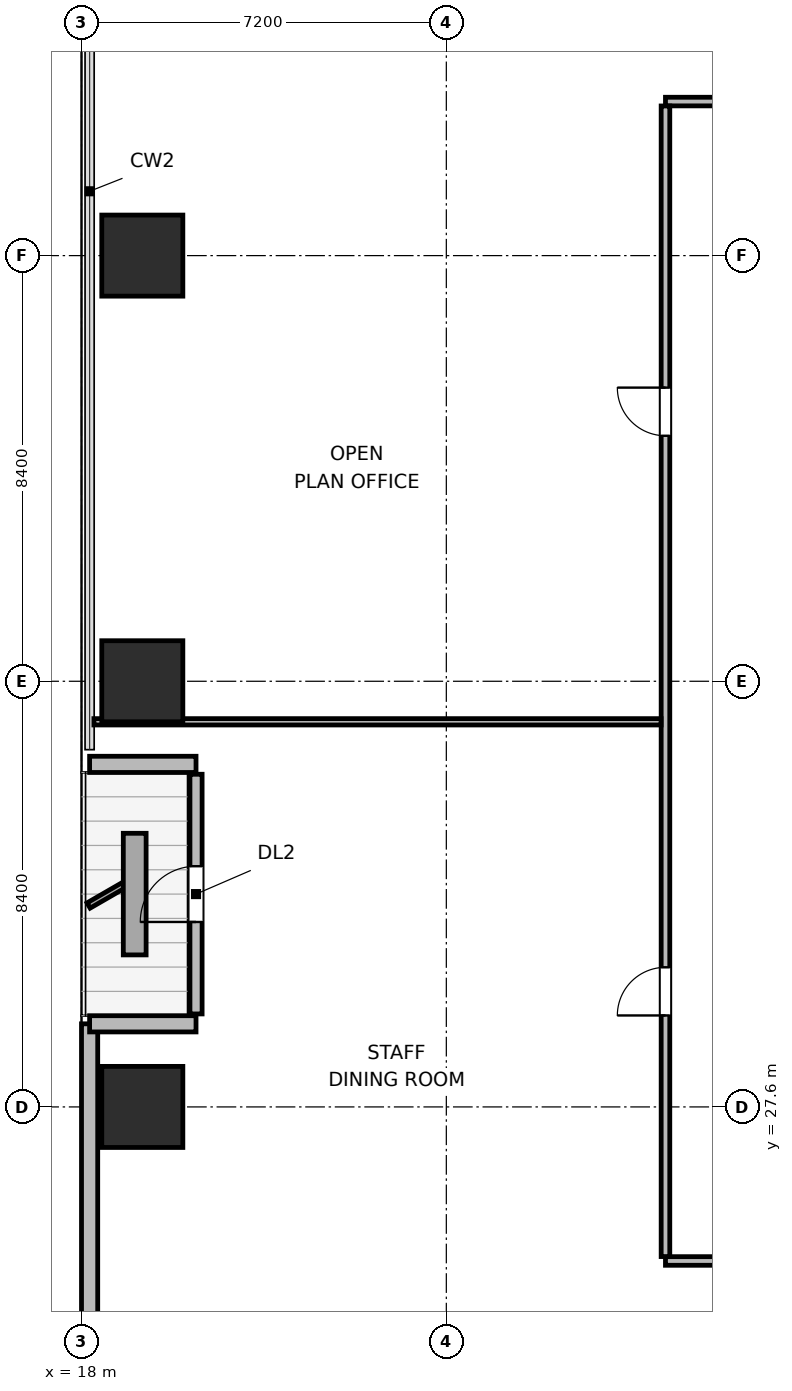
"""IFC4 building model, lengths in metres.
Left out: names, types, materials, properties, quantities, classifications, styles, units other than length and angle.
Written with IfcOpenShell. Run it as: python <this file> out.ifc"""

import sys

from ifc_helpers import new_model, si_unit, direction, frame, frame_2d, origin, origin_2d, place, context, subcontext, project, spatial, rectangle, extrude, element, fill, save


model = new_model("IFC4")
c1 = context("Model", 3, precision=1e-05, world=origin(), true_north=direction((0.0, 1.0)))
c2 = subcontext(c1, "Body", "Model", "MODEL_VIEW")
j1 = project(units=[si_unit("LENGTHUNIT", "METRE"), si_unit("PLANEANGLEUNIT", "RADIAN")], contexts=[c1])
p1 = place(None, origin())
s1 = spatial("IfcSite", under=j1, at=p1, CompositionType="ELEMENT")
p2 = place(p1, origin())
s2 = spatial("IfcBuilding", under=s1, at=p2, CompositionType="ELEMENT")
p3 = place(p2, frame((0.0, 0.0, 60.6)))
s3 = spatial("IfcBuildingStorey", under=s2, at=p3, CompositionType="ELEMENT", Elevation=60.6)
for number, where, z_axis, x_axis in (
    (1, (19.2, 27.6, 0.0), (0.0, 0.0, 1.0), (1.0, 0.0, 0.0)),
    (2, (19.2, 36.0, 0.0), (0.0, 0.0, 1.0), (1.0, 0.0, 0.0)),
    (3, (19.2, 44.4, 0.0), (0.0, 0.0, 1.0), (1.0, 0.0, 0.0)),
):
    element("IfcColumn", number, at=place(p3, frame(where, z_axis=z_axis, x_axis=x_axis)), inside=s3, PredefinedType="COLUMN", context=c2, shape_type="SweptSolid", body=[
        extrude(rectangle(XDim=1.6, YDim=1.6, at=origin_2d()), origin(), (0.0, 0.0, 1.0), 3.9),
    ])
p4 = place(p3, frame((18.16, 15.021, 0.0), z_axis=(0.0, 0.0, 1.0), x_axis=(0.0, 1.0, 0.0)))
e4 = element("IfcWall", 4, at=p4, inside=s3, PredefinedType="SOLIDWALL", context=c2, shape_type="SweptSolid", body=[
    extrude(rectangle(XDim=14.219, YDim=0.32, at=frame_2d((7.109, 0.0))), origin(), (0.0, 0.0, 1.0), 3.64),
])
p5 = place(p3, frame((18.16, 29.24, 0.0), z_axis=(0.0, 0.0, 1.0), x_axis=(1.0, 0.0, 0.0)))
e5 = element("IfcWall", 5, at=p5, inside=s3, PredefinedType="SOLIDWALL", context=c2, shape_type="SweptSolid", body=[
    extrude(rectangle(XDim=2.1, YDim=0.32, at=frame_2d((1.05, 0.0))), origin(), (0.0, 0.0, 1.0), 2.875),
])
p6 = place(p3, frame((20.26, 29.435, 0.0), z_axis=(0.0, 0.0, 1.0), x_axis=(0.0, 1.0, 0.0)))
e6 = element("IfcWall", 6, at=p6, inside=s3, PredefinedType="SOLIDWALL", context=c2, shape_type="SweptSolid", body=[
    extrude(rectangle(XDim=4.73, YDim=0.24, at=frame_2d((2.365, 0.0))), origin(), (0.0, 0.0, 1.0), 3.162),
])
p7 = place(p6, frame((1.815, 0.0, 0.0)))
e7 = element("IfcOpeningElement", 7, at=p7, cuts=e6, PredefinedType="OPENING", context=c2, shape_type="SweptSolid", body=[
    extrude(rectangle(XDim=1.1, YDim=2.04, at=frame_2d((0.55, 1.02))), frame((0.0, 0.13, 0.0), z_axis=(0.0, -1.0, 0.0), x_axis=(1.0, 0.0, 0.0)), (0.0, 0.0, 1.0), 0.26),
])
p8 = place(p3, frame((20.26, 34.36, 0.0), z_axis=(0.0, 0.0, 1.0), x_axis=(-1.0, 0.0, 0.0)))
e8 = element("IfcWall", 8, at=p8, inside=s3, PredefinedType="SOLIDWALL", context=c2, shape_type="SweptSolid", body=[
    extrude(rectangle(XDim=2.1, YDim=0.32, at=frame_2d((1.05, 0.0))), origin(), (0.0, 0.0, 1.0), 2.875),
])
p9 = place(p3, frame((29.525, 24.56, 0.0), z_axis=(0.0, 0.0, 1.0), x_axis=(1.0, 0.0, 0.0)))
e9 = element("IfcWall", 9, at=p9, inside=s3, PredefinedType="PARTITIONING", context=c2, shape_type="SweptSolid", body=[
    extrude(rectangle(XDim=36.95, YDim=0.17, at=frame_2d((18.475, 0.0))), origin(), (0.0, 0.0, 1.0), 3.64),
])
p10 = place(p9, frame((2.283, 0.0, 0.0)))
e10 = element("IfcOpeningElement", 10, at=p10, cuts=e9, PredefinedType="OPENING", context=c2, shape_type="SweptSolid", body=[
    extrude(rectangle(XDim=0.95, YDim=2.04, at=frame_2d((0.475, 1.02))), frame((0.0, 0.095, 0.0), z_axis=(0.0, -1.0, 0.0), x_axis=(1.0, 0.0, 0.0)), (0.0, 0.0, 1.0), 0.19),
])
p11 = place(p9, frame((7.2, 0.0, 0.0)))
e11 = element("IfcOpeningElement", 11, at=p11, cuts=e9, PredefinedType="OPENING", context=c2, shape_type="SweptSolid", body=[
    extrude(rectangle(XDim=0.95, YDim=2.04, at=frame_2d((0.475, 1.02))), frame((0.0, 0.095, 0.0), z_axis=(0.0, -1.0, 0.0), x_axis=(1.0, 0.0, 0.0)), (0.0, 0.0, 1.0), 0.19),
])
p12 = place(p9, frame((11.52, 0.0, 0.0)))
e12 = element("IfcOpeningElement", 12, at=p12, cuts=e9, PredefinedType="OPENING", context=c2, shape_type="SweptSolid", body=[
    extrude(rectangle(XDim=0.95, YDim=2.04, at=frame_2d((0.475, 1.02))), frame((0.0, 0.095, 0.0), z_axis=(0.0, -1.0, 0.0), x_axis=(1.0, 0.0, 0.0)), (0.0, 0.0, 1.0), 0.19),
])
p13 = place(p9, frame((15.84, 0.0, 0.0)))
e13 = element("IfcOpeningElement", 13, at=p13, cuts=e9, PredefinedType="OPENING", context=c2, shape_type="SweptSolid", body=[
    extrude(rectangle(XDim=0.95, YDim=2.04, at=frame_2d((0.475, 1.02))), frame((0.0, 0.095, 0.0), z_axis=(0.0, -1.0, 0.0), x_axis=(1.0, 0.0, 0.0)), (0.0, 0.0, 1.0), 0.19),
])
p14 = place(p9, frame((20.16, 0.0, 0.0)))
e14 = element("IfcOpeningElement", 14, at=p14, cuts=e9, PredefinedType="OPENING", context=c2, shape_type="SweptSolid", body=[
    extrude(rectangle(XDim=0.95, YDim=2.04, at=frame_2d((0.475, 1.02))), frame((0.0, 0.095, 0.0), z_axis=(0.0, -1.0, 0.0), x_axis=(1.0, 0.0, 0.0)), (0.0, 0.0, 1.0), 0.19),
])
p15 = place(p9, frame((24.48, 0.0, 0.0)))
e15 = element("IfcOpeningElement", 15, at=p15, cuts=e9, PredefinedType="OPENING", context=c2, shape_type="SweptSolid", body=[
    extrude(rectangle(XDim=0.95, YDim=2.04, at=frame_2d((0.475, 1.02))), frame((0.0, 0.095, 0.0), z_axis=(0.0, -1.0, 0.0), x_axis=(1.0, 0.0, 0.0)), (0.0, 0.0, 1.0), 0.19),
])
p16 = place(p9, frame((28.8, 0.0, 0.0)))
e16 = element("IfcOpeningElement", 16, at=p16, cuts=e9, PredefinedType="OPENING", context=c2, shape_type="SweptSolid", body=[
    extrude(rectangle(XDim=0.95, YDim=2.04, at=frame_2d((0.475, 1.02))), frame((0.0, 0.095, 0.0), z_axis=(0.0, -1.0, 0.0), x_axis=(1.0, 0.0, 0.0)), (0.0, 0.0, 1.0), 0.19),
])
p17 = place(p9, frame((33.718, 0.0, 0.0)))
e17 = element("IfcOpeningElement", 17, at=p17, cuts=e9, PredefinedType="OPENING", context=c2, shape_type="SweptSolid", body=[
    extrude(rectangle(XDim=0.95, YDim=2.04, at=frame_2d((0.475, 1.02))), frame((0.0, 0.095, 0.0), z_axis=(0.0, -1.0, 0.0), x_axis=(1.0, 0.0, 0.0)), (0.0, 0.0, 1.0), 0.19),
])
p18 = place(p3, frame((29.525, 47.44, 0.0), z_axis=(0.0, 0.0, 1.0), x_axis=(1.0, 0.0, 0.0)))
e18 = element("IfcWall", 18, at=p18, inside=s3, PredefinedType="PARTITIONING", context=c2, shape_type="SweptSolid", body=[
    extrude(rectangle(XDim=36.95, YDim=0.17, at=frame_2d((18.475, 0.0))), origin(), (0.0, 0.0, 1.0), 3.64),
])
p19 = place(p18, frame((4.133, 0.0, 0.0)))
e19 = element("IfcOpeningElement", 19, at=p19, cuts=e18, PredefinedType="OPENING", context=c2, shape_type="SweptSolid", body=[
    extrude(rectangle(XDim=0.95, YDim=2.04, at=frame_2d((0.475, 1.02))), frame((0.0, 0.095, 0.0), z_axis=(0.0, -1.0, 0.0), x_axis=(1.0, 0.0, 0.0)), (0.0, 0.0, 1.0), 0.19),
])
p20 = place(p18, frame((13.645, 0.0, 0.0)))
e20 = element("IfcOpeningElement", 20, at=p20, cuts=e18, PredefinedType="OPENING", context=c2, shape_type="SweptSolid", body=[
    extrude(rectangle(XDim=0.95, YDim=2.04, at=frame_2d((0.475, 1.02))), frame((0.0, 0.095, 0.0), z_axis=(0.0, -1.0, 0.0), x_axis=(1.0, 0.0, 0.0)), (0.0, 0.0, 1.0), 0.19),
])
p21 = place(p18, frame((20.555, 0.0, 0.0)))
e21 = element("IfcOpeningElement", 21, at=p21, cuts=e18, PredefinedType="OPENING", context=c2, shape_type="SweptSolid", body=[
    extrude(rectangle(XDim=0.95, YDim=2.04, at=frame_2d((0.475, 1.02))), frame((0.0, 0.095, 0.0), z_axis=(0.0, -1.0, 0.0), x_axis=(1.0, 0.0, 0.0)), (0.0, 0.0, 1.0), 0.19),
])
p22 = place(p18, frame((29.517, 0.0, 0.0)))
e22 = element("IfcOpeningElement", 22, at=p22, cuts=e18, PredefinedType="OPENING", context=c2, shape_type="SweptSolid", body=[
    extrude(rectangle(XDim=0.95, YDim=2.04, at=frame_2d((0.475, 1.02))), frame((0.0, 0.095, 0.0), z_axis=(0.0, -1.0, 0.0), x_axis=(1.0, 0.0, 0.0)), (0.0, 0.0, 1.0), 0.19),
])
p23 = place(p3, frame((29.525, 24.647, 0.0), z_axis=(0.0, 0.0, 1.0), x_axis=(0.0, 1.0, 0.0)))
e23 = element("IfcWall", 23, at=p23, inside=s3, PredefinedType="PARTITIONING", context=c2, shape_type="SweptSolid", body=[
    extrude(rectangle(XDim=22.706, YDim=0.17, at=frame_2d((11.353, 0.0))), origin(), (0.0, 0.0, 1.0), 3.64),
])
p24 = place(p23, frame((4.758, 0.0, 0.0)))
e24 = element("IfcOpeningElement", 24, at=p24, cuts=e23, PredefinedType="OPENING", context=c2, shape_type="SweptSolid", body=[
    extrude(rectangle(XDim=0.95, YDim=2.04, at=frame_2d((0.475, 1.02))), frame((0.0, 0.095, 0.0), z_axis=(0.0, -1.0, 0.0), x_axis=(1.0, 0.0, 0.0)), (0.0, 0.0, 1.0), 0.19),
])
p25 = place(p23, frame((16.198, 0.0, 0.0)))
e25 = element("IfcOpeningElement", 25, at=p25, cuts=e23, PredefinedType="OPENING", context=c2, shape_type="SweptSolid", body=[
    extrude(rectangle(XDim=0.95, YDim=2.04, at=frame_2d((0.475, 1.02))), frame((0.0, 0.095, 0.0), z_axis=(0.0, -1.0, 0.0), x_axis=(1.0, 0.0, 0.0)), (0.0, 0.0, 1.0), 0.19),
])
p26 = place(p3, frame((18.245, 35.2, 0.0), z_axis=(0.0, 0.0, 1.0), x_axis=(1.0, 0.0, 0.0)))
e26 = element("IfcWall", 26, at=p26, inside=s3, PredefinedType="PARTITIONING", context=c2, shape_type="SweptSolid", body=[
    extrude(rectangle(XDim=11.193, YDim=0.125, at=frame_2d((5.596, 0.0))), origin(), (0.0, 0.0, 1.0), 3.64),
])
p27 = place(p7, origin())
e27 = element("IfcDoor", 27, at=p27, inside=s3, OperationType="SINGLE_SWING_LEFT", PredefinedType="DOOR", context=c2, shape_type="SweptSolid", body=[
    extrude(rectangle(XDim=1.1, YDim=2.04, at=frame_2d((0.55, 1.02))), frame((0.0, 0.025, 0.0), z_axis=(0.0, -1.0, 0.0), x_axis=(1.0, 0.0, 0.0)), (0.0, 0.0, 1.0), 0.05),
])
fill(e7, e27)
p28 = place(p24, origin())
e28 = element("IfcDoor", 28, at=p28, inside=s3, OperationType="SINGLE_SWING_LEFT", PredefinedType="DOOR", context=c2, shape_type="SweptSolid", body=[
    extrude(rectangle(XDim=0.95, YDim=2.04, at=frame_2d((0.475, 1.02))), frame((0.0, 0.025, 0.0), z_axis=(0.0, -1.0, 0.0), x_axis=(1.0, 0.0, 0.0)), (0.0, 0.0, 1.0), 0.05),
])
fill(e24, e28)
p29 = place(p25, origin())
e29 = element("IfcDoor", 29, at=p29, inside=s3, OperationType="SINGLE_SWING_RIGHT", PredefinedType="DOOR", context=c2, shape_type="SweptSolid", body=[
    extrude(rectangle(XDim=0.95, YDim=2.04, at=frame_2d((0.475, 1.02))), frame((0.0, 0.025, 0.0), z_axis=(0.0, -1.0, 0.0), x_axis=(1.0, 0.0, 0.0)), (0.0, 0.0, 1.0), 0.05),
])
fill(e25, e29)
save(model, sys.argv[1])
